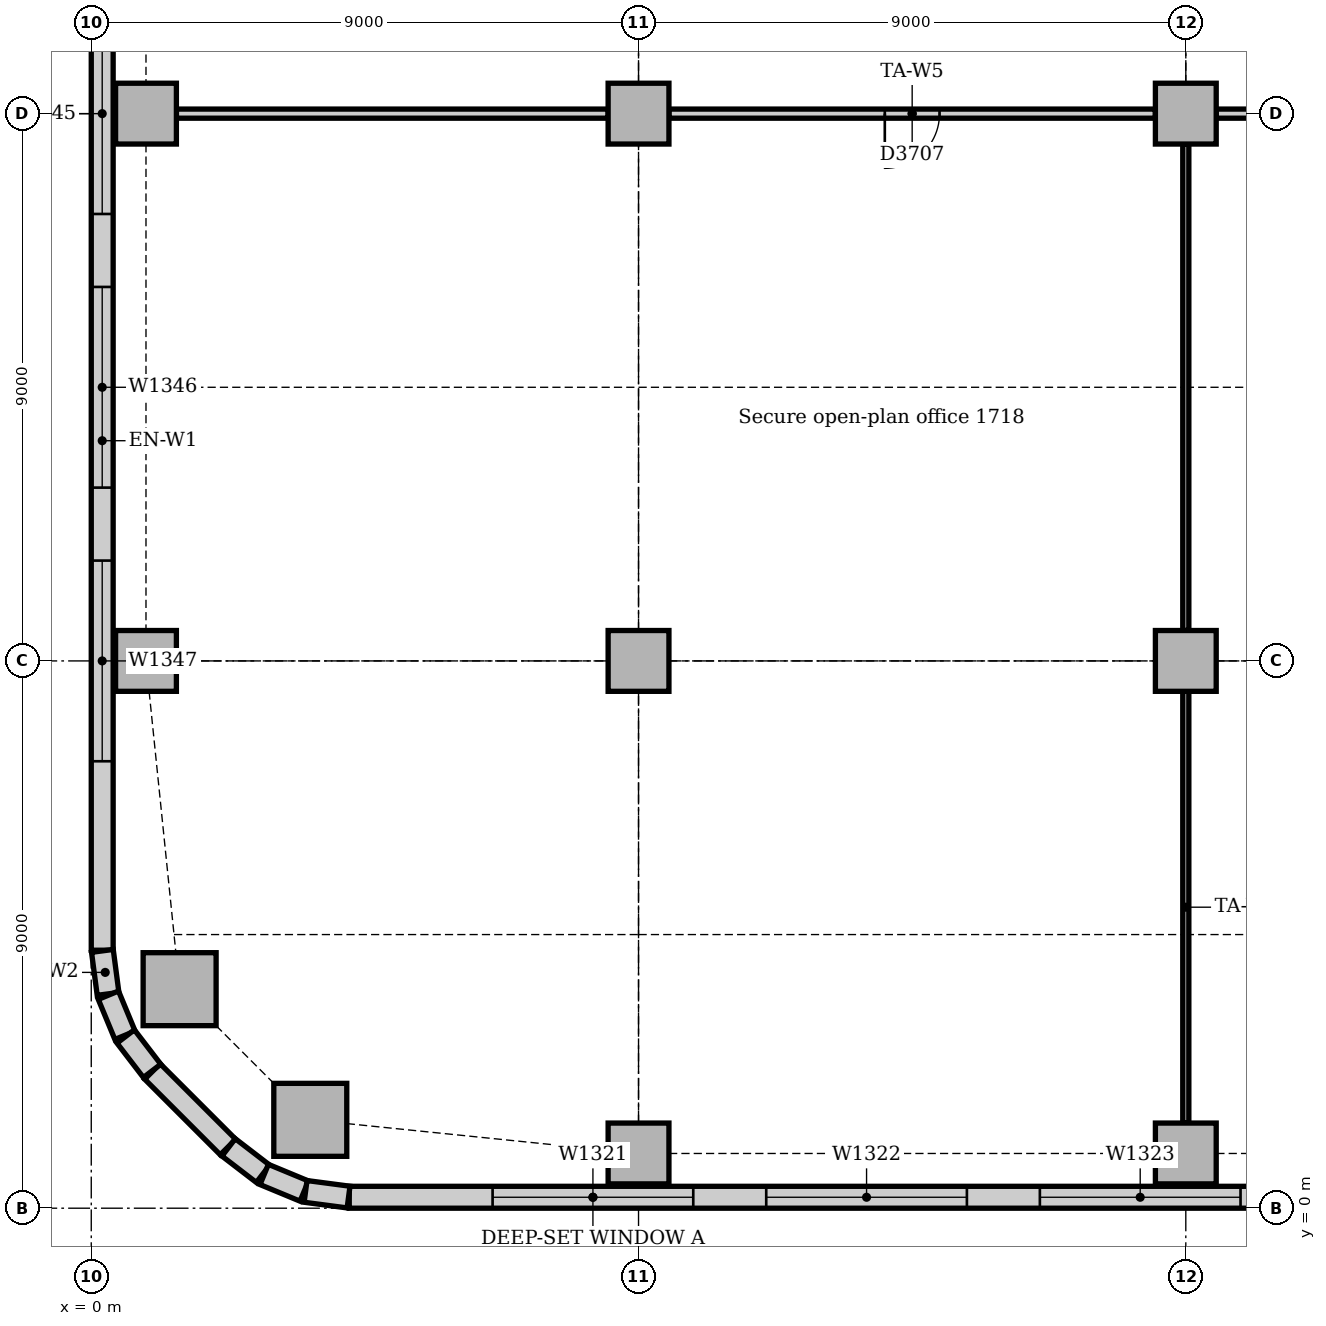
"""IFC4 building model, lengths in metres.
Left out: names, types, materials, properties, quantities, classifications, styles, units other than length and angle.
Written with IfcOpenShell. Run it as: python <this file> out.ifc"""

import sys

from ifc_helpers import new_model, si_unit, direction, frame, frame_2d, origin, origin_2d, place, context, subcontext, project, spatial, rectangle, extrude, element, fill, save


model = new_model("IFC4")
c1 = context("Model", 3, precision=1e-05, world=origin(), true_north=direction((0.0, 1.0)))
c2 = subcontext(c1, "Body", "Model", "MODEL_VIEW")
j1 = project(units=[si_unit("LENGTHUNIT", "METRE"), si_unit("PLANEANGLEUNIT", "RADIAN")], contexts=[c1])
p1 = place(None, origin())
s1 = spatial("IfcSite", under=j1, at=p1, CompositionType="ELEMENT")
p2 = place(p1, origin())
s2 = spatial("IfcBuilding", under=s1, at=p2, CompositionType="ELEMENT")
p3 = place(p2, frame((0.0, 0.0, 75.0)))
s3 = spatial("IfcBuildingStorey", under=s2, at=p3, CompositionType="ELEMENT", Elevation=75.0)
for number, where, z_axis, x_axis in (
    (1, (3.602, 1.453, 0.0), (0.0, 0.0, 1.0), (1.0, 0.0, 0.0)),
    (2, (1.453, 3.602, 0.0), (0.0, 0.0, 1.0), (1.0, 0.0, 0.0)),
):
    element("IfcColumn", number, at=place(p3, frame(where, z_axis=z_axis, x_axis=x_axis)), inside=s3, PredefinedType="COLUMN", context=c2, shape_type="SweptSolid", body=[
        extrude(rectangle(XDim=1.2, YDim=1.2, at=origin_2d()), origin(), (0.0, 0.0, 1.0), 3.85),
    ])
for number, where, z_axis, x_axis in (
    (3, (9.0, 0.9, 0.0), (0.0, 0.0, 1.0), (1.0, 0.0, 0.0)),
    (4, (18.0, 0.9, 0.0), (0.0, 0.0, 1.0), (1.0, 0.0, 0.0)),
    (5, (0.9, 9.0, 0.0), (0.0, 0.0, 1.0), (1.0, 0.0, 0.0)),
    (6, (0.9, 18.0, 0.0), (0.0, 0.0, 1.0), (1.0, 0.0, 0.0)),
    (7, (9.0, 9.0, 0.0), (0.0, 0.0, 1.0), (1.0, 0.0, 0.0)),
    (8, (9.0, 18.0, 0.0), (0.0, 0.0, 1.0), (1.0, 0.0, 0.0)),
    (9, (18.0, 9.0, 0.0), (0.0, 0.0, 1.0), (1.0, 0.0, 0.0)),
    (10, (18.0, 18.0, 0.0), (0.0, 0.0, 1.0), (1.0, 0.0, 0.0)),
):
    element("IfcColumn", number, at=place(p3, frame(where, z_axis=z_axis, x_axis=x_axis)), inside=s3, PredefinedType="COLUMN", context=c2, shape_type="SweptSolid", body=[
        extrude(rectangle(XDim=1.0, YDim=1.0, at=origin_2d()), origin(), (0.0, 0.0, 1.0), 3.85),
    ])
p4 = place(p3, frame((4.243, 0.18, 0.0), z_axis=(0.0, 0.0, 1.0), x_axis=(1.0, 0.0, 0.0)))
e11 = element("IfcWall", 11, at=p4, inside=s3, PredefinedType="STANDARD", context=c2, shape_type="SweptSolid", body=[
    extrude(rectangle(XDim=44.015, YDim=0.36, at=frame_2d((22.007, 0.0))), origin(), (0.0, 0.0, 1.0), 3.85),
])
p5 = place(p4, frame((2.357, 0.0, 0.9)))
e12 = element("IfcOpeningElement", 12, at=p5, cuts=e11, PredefinedType="OPENING", context=c2, shape_type="SweptSolid", body=[
    extrude(rectangle(XDim=3.3, YDim=1.6, at=frame_2d((1.65, 0.8))), frame((0.0, 0.19, 0.0), z_axis=(0.0, -1.0, 0.0), x_axis=(1.0, 0.0, 0.0)), (0.0, 0.0, 1.0), 0.38),
])
p6 = place(p4, frame((6.857, 0.0, 0.9)))
e13 = element("IfcOpeningElement", 13, at=p6, cuts=e11, PredefinedType="OPENING", context=c2, shape_type="SweptSolid", body=[
    extrude(rectangle(XDim=3.3, YDim=1.6, at=frame_2d((1.65, 0.8))), frame((0.0, 0.19, 0.0), z_axis=(0.0, -1.0, 0.0), x_axis=(1.0, 0.0, 0.0)), (0.0, 0.0, 1.0), 0.38),
])
p7 = place(p4, frame((11.357, 0.0, 0.9)))
e14 = element("IfcOpeningElement", 14, at=p7, cuts=e11, PredefinedType="OPENING", context=c2, shape_type="SweptSolid", body=[
    extrude(rectangle(XDim=3.3, YDim=1.6, at=frame_2d((1.65, 0.8))), frame((0.0, 0.19, 0.0), z_axis=(0.0, -1.0, 0.0), x_axis=(1.0, 0.0, 0.0)), (0.0, 0.0, 1.0), 0.38),
])
p8 = place(p4, frame((15.857, 0.0, 0.9)))
e15 = element("IfcOpeningElement", 15, at=p8, cuts=e11, PredefinedType="OPENING", context=c2, shape_type="SweptSolid", body=[
    extrude(rectangle(XDim=3.3, YDim=1.6, at=frame_2d((1.65, 0.8))), frame((0.0, 0.19, 0.0), z_axis=(0.0, -1.0, 0.0), x_axis=(1.0, 0.0, 0.0)), (0.0, 0.0, 1.0), 0.38),
])
p9 = place(p4, frame((20.357, 0.0, 0.9)))
e16 = element("IfcOpeningElement", 16, at=p9, cuts=e11, PredefinedType="OPENING", context=c2, shape_type="SweptSolid", body=[
    extrude(rectangle(XDim=3.3, YDim=1.6, at=frame_2d((1.65, 0.8))), frame((0.0, 0.19, 0.0), z_axis=(0.0, -1.0, 0.0), x_axis=(1.0, 0.0, 0.0)), (0.0, 0.0, 1.0), 0.38),
])
p10 = place(p4, frame((24.857, 0.0, 0.9)))
e17 = element("IfcOpeningElement", 17, at=p10, cuts=e11, PredefinedType="OPENING", context=c2, shape_type="SweptSolid", body=[
    extrude(rectangle(XDim=3.3, YDim=1.6, at=frame_2d((1.65, 0.8))), frame((0.0, 0.19, 0.0), z_axis=(0.0, -1.0, 0.0), x_axis=(1.0, 0.0, 0.0)), (0.0, 0.0, 1.0), 0.38),
])
p11 = place(p4, frame((29.357, 0.0, 0.9)))
e18 = element("IfcOpeningElement", 18, at=p11, cuts=e11, PredefinedType="OPENING", context=c2, shape_type="SweptSolid", body=[
    extrude(rectangle(XDim=3.3, YDim=1.6, at=frame_2d((1.65, 0.8))), frame((0.0, 0.19, 0.0), z_axis=(0.0, -1.0, 0.0), x_axis=(1.0, 0.0, 0.0)), (0.0, 0.0, 1.0), 0.38),
])
p12 = place(p4, frame((33.857, 0.0, 0.9)))
e19 = element("IfcOpeningElement", 19, at=p12, cuts=e11, PredefinedType="OPENING", context=c2, shape_type="SweptSolid", body=[
    extrude(rectangle(XDim=3.3, YDim=1.6, at=frame_2d((1.65, 0.8))), frame((0.0, 0.19, 0.0), z_axis=(0.0, -1.0, 0.0), x_axis=(1.0, 0.0, 0.0)), (0.0, 0.0, 1.0), 0.38),
])
p13 = place(p4, frame((38.357, 0.0, 0.9)))
e20 = element("IfcOpeningElement", 20, at=p13, cuts=e11, PredefinedType="OPENING", context=c2, shape_type="SweptSolid", body=[
    extrude(rectangle(XDim=3.3, YDim=1.6, at=frame_2d((1.65, 0.8))), frame((0.0, 0.19, 0.0), z_axis=(0.0, -1.0, 0.0), x_axis=(1.0, 0.0, 0.0)), (0.0, 0.0, 1.0), 0.38),
])
p14 = place(p3, frame((0.18, 21.0, 0.0), z_axis=(0.0, 0.0, 1.0), x_axis=(0.0, -1.0, 0.0)))
e21 = element("IfcWall", 21, at=p14, inside=s3, PredefinedType="STANDARD", context=c2, shape_type="SweptSolid", body=[
    extrude(rectangle(XDim=16.757, YDim=0.36, at=frame_2d((8.379, 0.0))), origin(), (0.0, 0.0, 1.0), 3.85),
])
p15 = place(p14, frame((1.35, 0.0, 0.9)))
e22 = element("IfcOpeningElement", 22, at=p15, cuts=e21, PredefinedType="OPENING", context=c2, shape_type="SweptSolid", body=[
    extrude(rectangle(XDim=3.3, YDim=1.6, at=frame_2d((1.65, 0.8))), frame((0.0, 0.19, 0.0), z_axis=(0.0, -1.0, 0.0), x_axis=(1.0, 0.0, 0.0)), (0.0, 0.0, 1.0), 0.38),
])
p16 = place(p14, frame((5.85, 0.0, 0.9)))
e23 = element("IfcOpeningElement", 23, at=p16, cuts=e21, PredefinedType="OPENING", context=c2, shape_type="SweptSolid", body=[
    extrude(rectangle(XDim=3.3, YDim=1.6, at=frame_2d((1.65, 0.8))), frame((0.0, 0.19, 0.0), z_axis=(0.0, -1.0, 0.0), x_axis=(1.0, 0.0, 0.0)), (0.0, 0.0, 1.0), 0.38),
])
p17 = place(p14, frame((10.35, 0.0, 0.9)))
e24 = element("IfcOpeningElement", 24, at=p17, cuts=e21, PredefinedType="OPENING", context=c2, shape_type="SweptSolid", body=[
    extrude(rectangle(XDim=3.3, YDim=1.6, at=frame_2d((1.65, 0.8))), frame((0.0, 0.19, 0.0), z_axis=(0.0, -1.0, 0.0), x_axis=(1.0, 0.0, 0.0)), (0.0, 0.0, 1.0), 0.38),
])
p18 = place(p3, frame((1.006, 2.249, 0.0), z_axis=(0.0, 0.0, 1.0), x_axis=(0.707106781187, -0.707106781187, 0.0)))
e25 = element("IfcWall", 25, at=p18, inside=s3, PredefinedType="STANDARD", context=c2, shape_type="SweptSolid", body=[
    extrude(rectangle(XDim=1.757, YDim=0.36, at=frame_2d((0.879, 0.0))), origin(), (0.0, 0.0, 1.0), 3.85),
])
for number, where, z_axis, x_axis in (
    (26, (0.183, 4.231, 0.0), (0.0, 0.0, 1.0), (0.131, -0.991, 0.0)),
    (27, (0.282, 3.503, 0.0), (0.0, 0.0, 1.0), (0.383, -0.924, 0.0)),
):
    element("IfcWall", number, at=place(p3, frame(where, z_axis=z_axis, x_axis=x_axis)), inside=s3, PredefinedType="STANDARD", context=c2, shape_type="SweptSolid", body=[
        extrude(rectangle(XDim=0.713, YDim=0.36, at=frame_2d((0.356, 0.0))), origin(), (0.0, 0.0, 1.0), 3.85),
    ])
for number, where, z_axis, x_axis in (
    (28, (0.566, 2.825, 0.0), (0.0, 0.0, 1.0), (0.609, -0.793, 0.0)),
    (29, (2.259, 1.0, 0.0), (0.0, 0.0, 1.0), (0.793, -0.609, 0.0)),
):
    element("IfcWall", number, at=place(p3, frame(where, z_axis=z_axis, x_axis=x_axis)), inside=s3, PredefinedType="STANDARD", context=c2, shape_type="SweptSolid", body=[
        extrude(rectangle(XDim=0.713, YDim=0.36, at=frame_2d((0.357, 0.0))), origin(), (0.0, 0.0, 1.0), 3.85),
    ])
for number, where, z_axis, x_axis in (
    (30, (2.844, 0.555, 0.0), (0.0, 0.0, 1.0), (0.924, -0.383, 0.0)),
    (31, (3.524, 0.276, 0.0), (0.0, 0.0, 1.0), (0.991, -0.131, 0.0)),
):
    element("IfcWall", number, at=place(p3, frame(where, z_axis=z_axis, x_axis=x_axis)), inside=s3, PredefinedType="STANDARD", context=c2, shape_type="SweptSolid", body=[
        extrude(rectangle(XDim=0.713, YDim=0.36, at=frame_2d((0.356, 0.0))), origin(), (0.0, 0.0, 1.0), 3.85),
    ])
p19 = place(p3, frame((18.5, 18.0, 0.0), z_axis=(0.0, 0.0, 1.0), x_axis=(1.0, 0.0, 0.0)))
e32 = element("IfcWall", 32, at=p19, inside=s3, PredefinedType="PARTITIONING", context=c2, shape_type="SweptSolid", body=[
    extrude(rectangle(XDim=8.0, YDim=0.15, at=frame_2d((4.0, 0.0))), origin(), (0.0, 0.0, 1.0), 3.15),
])
p20 = place(p3, frame((9.5, 18.0, 0.0), z_axis=(0.0, 0.0, 1.0), x_axis=(1.0, 0.0, 0.0)))
e33 = element("IfcWall", 33, at=p20, inside=s3, PredefinedType="PARTITIONING", context=c2, shape_type="SweptSolid", body=[
    extrude(rectangle(XDim=8.0, YDim=0.15, at=frame_2d((4.0, 0.0))), origin(), (0.0, 0.0, 1.0), 3.15),
])
p21 = place(p20, frame((3.55, 0.0, 0.0)))
e34 = element("IfcOpeningElement", 34, at=p21, cuts=e33, PredefinedType="OPENING", context=c2, shape_type="SweptSolid", body=[
    extrude(rectangle(XDim=0.9, YDim=2.1, at=frame_2d((0.45, 1.05))), frame((0.0, 0.085, 0.0), z_axis=(0.0, -1.0, 0.0), x_axis=(1.0, 0.0, 0.0)), (0.0, 0.0, 1.0), 0.17),
])
p22 = place(p3, frame((1.4, 18.0, 0.0), z_axis=(0.0, 0.0, 1.0), x_axis=(1.0, 0.0, 0.0)))
e35 = element("IfcWall", 35, at=p22, inside=s3, PredefinedType="PARTITIONING", context=c2, shape_type="SweptSolid", body=[
    extrude(rectangle(XDim=7.1, YDim=0.15, at=frame_2d((3.55, 0.0))), origin(), (0.0, 0.0, 1.0), 3.15),
])
p23 = place(p3, frame((18.0, 1.4, 0.0), z_axis=(0.0, 0.0, 1.0), x_axis=(0.0, 1.0, 0.0)))
e36 = element("IfcWall", 36, at=p23, inside=s3, PredefinedType="PARTITIONING", context=c2, shape_type="SweptSolid", body=[
    extrude(rectangle(XDim=7.1, YDim=0.1, at=frame_2d((3.55, 0.0))), origin(), (0.0, 0.0, 1.0), 3.158),
])
p24 = place(p3, frame((18.0, 9.5, 0.0), z_axis=(0.0, 0.0, 1.0), x_axis=(0.0, 1.0, 0.0)))
e37 = element("IfcWall", 37, at=p24, inside=s3, PredefinedType="PARTITIONING", context=c2, shape_type="SweptSolid", body=[
    extrude(rectangle(XDim=8.0, YDim=0.1, at=frame_2d((4.0, 0.0))), origin(), (0.0, 0.0, 1.0), 3.158),
])
p25 = place(p5, origin())
e38 = element("IfcWindow", 38, at=p25, inside=s3, PartitioningType="SINGLE_PANEL", PredefinedType="WINDOW", context=c2, shape_type="SweptSolid", body=[
    extrude(rectangle(XDim=3.3, YDim=1.6, at=frame_2d((1.65, 0.8))), frame((0.0, 0.13, 0.0), z_axis=(0.0, -1.0, 0.0), x_axis=(1.0, 0.0, 0.0)), (0.0, 0.0, 1.0), 0.06),
])
fill(e12, e38)
p26 = place(p6, origin())
e39 = element("IfcWindow", 39, at=p26, inside=s3, PartitioningType="SINGLE_PANEL", PredefinedType="WINDOW", context=c2, shape_type="SweptSolid", body=[
    extrude(rectangle(XDim=3.3, YDim=1.6, at=frame_2d((1.65, 0.8))), frame((0.0, 0.13, 0.0), z_axis=(0.0, -1.0, 0.0), x_axis=(1.0, 0.0, 0.0)), (0.0, 0.0, 1.0), 0.06),
])
fill(e13, e39)
p27 = place(p7, origin())
e40 = element("IfcWindow", 40, at=p27, inside=s3, PartitioningType="SINGLE_PANEL", PredefinedType="WINDOW", context=c2, shape_type="SweptSolid", body=[
    extrude(rectangle(XDim=3.3, YDim=1.6, at=frame_2d((1.65, 0.8))), frame((0.0, 0.13, 0.0), z_axis=(0.0, -1.0, 0.0), x_axis=(1.0, 0.0, 0.0)), (0.0, 0.0, 1.0), 0.06),
])
fill(e14, e40)
p28 = place(p15, origin())
e41 = element("IfcWindow", 41, at=p28, inside=s3, PartitioningType="SINGLE_PANEL", PredefinedType="WINDOW", context=c2, shape_type="SweptSolid", body=[
    extrude(rectangle(XDim=3.3, YDim=1.6, at=frame_2d((1.65, 0.8))), frame((0.0, 0.13, 0.0), z_axis=(0.0, -1.0, 0.0), x_axis=(1.0, 0.0, 0.0)), (0.0, 0.0, 1.0), 0.06),
])
fill(e22, e41)
p29 = place(p16, origin())
e42 = element("IfcWindow", 42, at=p29, inside=s3, PartitioningType="SINGLE_PANEL", PredefinedType="WINDOW", context=c2, shape_type="SweptSolid", body=[
    extrude(rectangle(XDim=3.3, YDim=1.6, at=frame_2d((1.65, 0.8))), frame((0.0, 0.13, 0.0), z_axis=(0.0, -1.0, 0.0), x_axis=(1.0, 0.0, 0.0)), (0.0, 0.0, 1.0), 0.06),
])
fill(e23, e42)
p30 = place(p17, origin())
e43 = element("IfcWindow", 43, at=p30, inside=s3, PartitioningType="SINGLE_PANEL", PredefinedType="WINDOW", context=c2, shape_type="SweptSolid", body=[
    extrude(rectangle(XDim=3.3, YDim=1.6, at=frame_2d((1.65, 0.8))), frame((0.0, 0.13, 0.0), z_axis=(0.0, -1.0, 0.0), x_axis=(1.0, 0.0, 0.0)), (0.0, 0.0, 1.0), 0.06),
])
fill(e24, e43)
p31 = place(p21, frame((0.9, 0.0, 0.0), z_axis=(0.0, 0.0, 1.0), x_axis=(-1.0, 0.0, 0.0)))
e44 = element("IfcDoor", 44, at=p31, inside=s3, OperationType="SINGLE_SWING_RIGHT", PredefinedType="DOOR", context=c2, shape_type="SweptSolid", body=[
    extrude(rectangle(XDim=0.9, YDim=2.1, at=frame_2d((0.45, 1.05))), frame((0.0, 0.025, 0.0), z_axis=(0.0, -1.0, 0.0), x_axis=(1.0, 0.0, 0.0)), (0.0, 0.0, 1.0), 0.05),
])
fill(e34, e44)
save(model, sys.argv[1])
